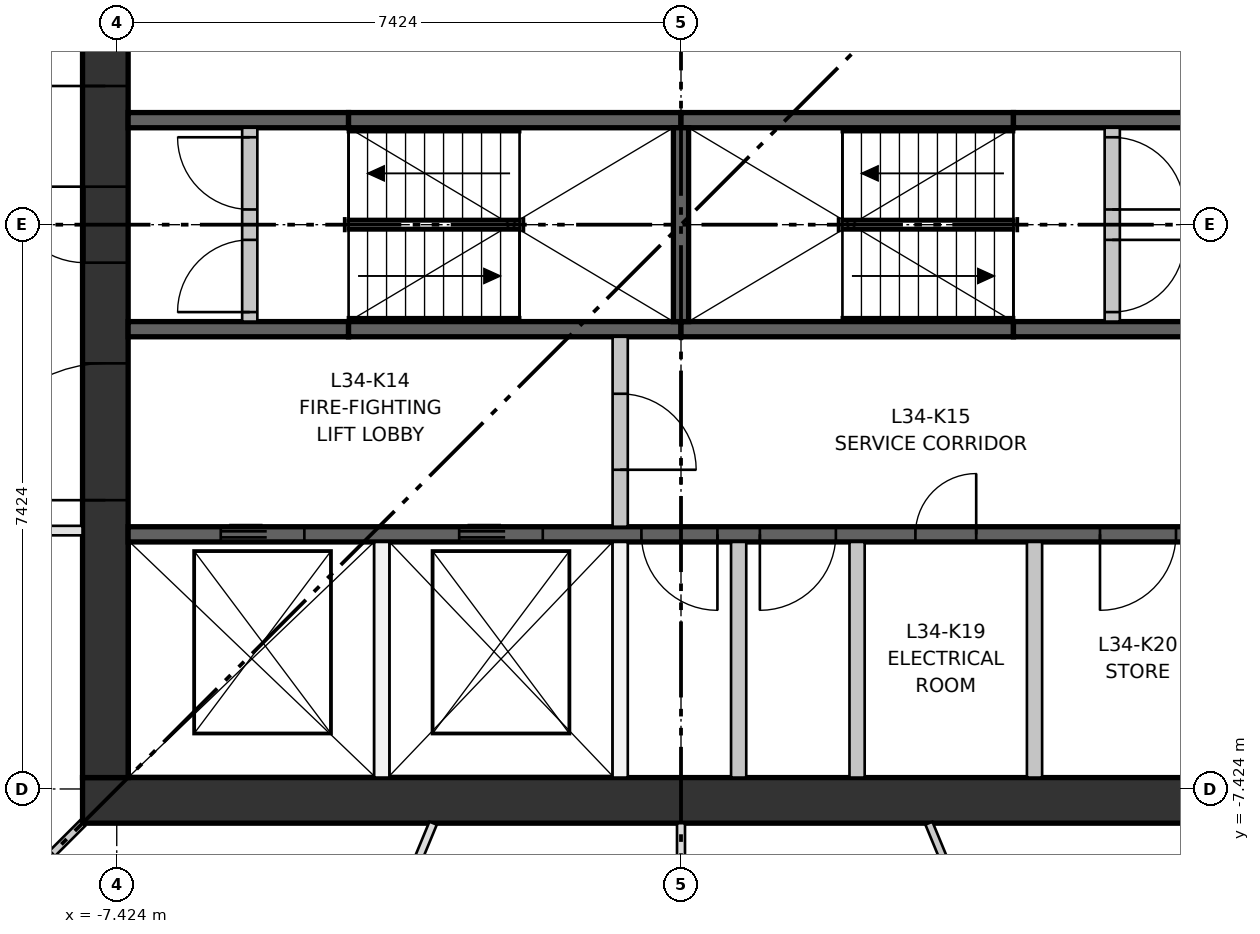
"""IFC4 building model, lengths in metres.
Left out: names, types, materials, properties, quantities, classifications, styles, units other than length and angle.
Written with IfcOpenShell. Run it as: python <this file> out.ifc"""

import sys

from ifc_helpers import new_model, si_unit, direction, frame, frame_2d, origin, place, context, subcontext, project, spatial, rectangle, extrude, element, fill, save


model = new_model("IFC4")
c1 = context("Model", 3, precision=1e-05, world=origin(), true_north=direction((0.0, 1.0)))
c2 = subcontext(c1, "Body", "Model", "MODEL_VIEW")
j1 = project(units=[si_unit("LENGTHUNIT", "METRE"), si_unit("PLANEANGLEUNIT", "RADIAN")], contexts=[c1])
p1 = place(None, origin())
s1 = spatial("IfcSite", under=j1, at=p1, CompositionType="ELEMENT")
p2 = place(p1, origin())
s2 = spatial("IfcBuilding", under=s1, at=p2, CompositionType="ELEMENT")
p3 = place(p2, frame((0.0, 0.0, 131.0)))
s3 = spatial("IfcBuildingStorey", under=s2, at=p3, CompositionType="ELEMENT", Elevation=131.0)
p4 = place(p3, frame((-7.874, -7.574, 0.0), z_axis=(0.0, 0.0, 1.0), x_axis=(1.0, 0.0, 0.0)))
e1 = element("IfcWall", 1, at=p4, inside=s3, PredefinedType="SHEAR", context=c2, shape_type="SweptSolid", body=[
    extrude(rectangle(XDim=15.748, YDim=0.6, at=frame_2d((7.874, 0.0))), origin(), (0.0, 0.0, 1.0), 3.35),
])
p5 = place(p3, frame((-7.574, -7.274, 0.0), z_axis=(0.0, 0.0, 1.0), x_axis=(0.0, 1.0, 0.0)))
e2 = element("IfcWall", 2, at=p5, inside=s3, PredefinedType="SHEAR", context=c2, shape_type="SweptSolid", body=[
    extrude(rectangle(XDim=14.548, YDim=0.6, at=frame_2d((7.274, 0.0))), origin(), (0.0, 0.0, 1.0), 3.35),
])
p6 = place(p5, frame((6.774, 0.0, 0.0)))
e3 = element("IfcOpeningElement", 3, at=p6, cuts=e2, PredefinedType="OPENING", context=c2, shape_type="SweptSolid", body=[
    extrude(rectangle(XDim=1.0, YDim=2.1, at=frame_2d((0.5, 1.05))), frame((0.0, 0.31, 0.0), z_axis=(0.0, -1.0, 0.0), x_axis=(1.0, 0.0, 0.0)), (0.0, 0.0, 1.0), 0.62),
])
p7 = place(p5, frame((3.649, 0.0, 0.0)))
e4 = element("IfcOpeningElement", 4, at=p7, cuts=e2, PredefinedType="OPENING", context=c2, shape_type="SweptSolid", body=[
    extrude(rectangle(XDim=1.8, YDim=2.1, at=frame_2d((0.9, 1.05))), frame((0.0, 0.31, 0.0), z_axis=(0.0, -1.0, 0.0), x_axis=(1.0, 0.0, 0.0)), (0.0, 0.0, 1.0), 0.62),
])
p8 = place(p5, frame((9.098, 0.0, 0.0)))
e5 = element("IfcOpeningElement", 5, at=p8, cuts=e2, PredefinedType="OPENING", context=c2, shape_type="SweptSolid", body=[
    extrude(rectangle(XDim=1.8, YDim=2.1, at=frame_2d((0.9, 1.05))), frame((0.0, 0.31, 0.0), z_axis=(0.0, -1.0, 0.0), x_axis=(1.0, 0.0, 0.0)), (0.0, 0.0, 1.0), 0.62),
])
p9 = place(p3, frame((-7.274, -4.074, 0.0), z_axis=(0.0, 0.0, 1.0), x_axis=(1.0, 0.0, 0.0)))
e6 = element("IfcWall", 6, at=p9, inside=s3, PredefinedType="SHEAR", context=c2, shape_type="SweptSolid", body=[
    extrude(rectangle(XDim=14.548, YDim=0.2, at=frame_2d((7.274, 0.0))), origin(), (0.0, 0.0, 1.0), 3.0),
])
p10 = place(p9, frame((1.219, 0.0, 0.0)))
e7 = element("IfcOpeningElement", 7, at=p10, cuts=e6, PredefinedType="OPENING", context=c2, shape_type="SweptSolid", body=[
    extrude(rectangle(XDim=1.1, YDim=2.1, at=frame_2d((0.55, 1.05))), frame((0.0, 0.11, 0.0), z_axis=(0.0, -1.0, 0.0), x_axis=(1.0, 0.0, 0.0)), (0.0, 0.0, 1.0), 0.22),
])
p11 = place(p9, frame((4.355, 0.0, 0.0)))
e8 = element("IfcOpeningElement", 8, at=p11, cuts=e6, PredefinedType="OPENING", context=c2, shape_type="SweptSolid", body=[
    extrude(rectangle(XDim=1.1, YDim=2.1, at=frame_2d((0.55, 1.05))), frame((0.0, 0.11, 0.0), z_axis=(0.0, -1.0, 0.0), x_axis=(1.0, 0.0, 0.0)), (0.0, 0.0, 1.0), 0.22),
])
p12 = place(p9, frame((6.753, 0.0, 0.0)))
e9 = element("IfcOpeningElement", 9, at=p12, cuts=e6, PredefinedType="OPENING", context=c2, shape_type="SweptSolid", body=[
    extrude(rectangle(XDim=1.0, YDim=2.1, at=frame_2d((0.5, 1.05))), frame((0.0, 0.11, 0.0), z_axis=(0.0, -1.0, 0.0), x_axis=(1.0, 0.0, 0.0)), (0.0, 0.0, 1.0), 0.22),
])
p13 = place(p9, frame((8.312, 0.0, 0.0)))
e10 = element("IfcOpeningElement", 10, at=p13, cuts=e6, PredefinedType="OPENING", context=c2, shape_type="SweptSolid", body=[
    extrude(rectangle(XDim=1.0, YDim=2.1, at=frame_2d((0.5, 1.05))), frame((0.0, 0.11, 0.0), z_axis=(0.0, -1.0, 0.0), x_axis=(1.0, 0.0, 0.0)), (0.0, 0.0, 1.0), 0.22),
])
p14 = place(p9, frame((10.358, 0.0, 0.0)))
e11 = element("IfcOpeningElement", 11, at=p14, cuts=e6, PredefinedType="OPENING", context=c2, shape_type="SweptSolid", body=[
    extrude(rectangle(XDim=0.8, YDim=2.1, at=frame_2d((0.4, 1.05))), frame((0.0, 0.11, 0.0), z_axis=(0.0, -1.0, 0.0), x_axis=(1.0, 0.0, 0.0)), (0.0, 0.0, 1.0), 0.22),
])
p15 = place(p9, frame((12.787, 0.0, 0.0)))
e12 = element("IfcOpeningElement", 12, at=p15, cuts=e6, PredefinedType="OPENING", context=c2, shape_type="SweptSolid", body=[
    extrude(rectangle(XDim=1.0, YDim=2.1, at=frame_2d((0.5, 1.05))), frame((0.0, 0.11, 0.0), z_axis=(0.0, -1.0, 0.0), x_axis=(1.0, 0.0, 0.0)), (0.0, 0.0, 1.0), 0.22),
])
p16 = place(p3, frame((-7.274, -1.375, 0.0), z_axis=(0.0, 0.0, 1.0), x_axis=(1.0, 0.0, 0.0)))
e13 = element("IfcWall", 13, at=p16, inside=s3, PredefinedType="SHEAR", context=c2, shape_type="SweptSolid", body=[
    extrude(rectangle(XDim=2.9, YDim=0.2, at=frame_2d((1.45, 0.0))), origin(), (0.0, 0.0, 1.0), 3.0),
])
for number, where, z_axis, x_axis in (
    (14, (-4.374, -1.375, 0.0), (0.0, 0.0, 1.0), (1.0, 0.0, 0.0)),
    (15, (0.0, -1.375, 0.0), (0.0, 0.0, 1.0), (1.0, 0.0, 0.0)),
):
    element("IfcWall", number, at=place(p3, frame(where, z_axis=z_axis, x_axis=x_axis)), inside=s3, PredefinedType="SHEAR", context=c2, shape_type="SweptSolid", body=[
        extrude(rectangle(XDim=4.374, YDim=0.2, at=frame_2d((2.187, 0.0))), origin(), (0.0, 0.0, 1.0), 3.0),
    ])
for number, where, z_axis, x_axis in (
    (16, (4.374, -1.375, 0.0), (0.0, 0.0, 1.0), (1.0, 0.0, 0.0)),
    (17, (-7.274, 1.375, 0.0), (0.0, 0.0, 1.0), (1.0, 0.0, 0.0)),
):
    element("IfcWall", number, at=place(p3, frame(where, z_axis=z_axis, x_axis=x_axis)), inside=s3, PredefinedType="SHEAR", context=c2, shape_type="SweptSolid", body=[
        extrude(rectangle(XDim=2.9, YDim=0.2, at=frame_2d((1.45, 0.0))), origin(), (0.0, 0.0, 1.0), 3.0),
    ])
for number, where, z_axis, x_axis in (
    (18, (-4.374, 1.375, 0.0), (0.0, 0.0, 1.0), (1.0, 0.0, 0.0)),
    (19, (0.0, 1.375, 0.0), (0.0, 0.0, 1.0), (1.0, 0.0, 0.0)),
):
    element("IfcWall", number, at=place(p3, frame(where, z_axis=z_axis, x_axis=x_axis)), inside=s3, PredefinedType="SHEAR", context=c2, shape_type="SweptSolid", body=[
        extrude(rectangle(XDim=4.374, YDim=0.2, at=frame_2d((2.187, 0.0))), origin(), (0.0, 0.0, 1.0), 3.0),
    ])
p17 = place(p3, frame((4.374, 1.375, 0.0), z_axis=(0.0, 0.0, 1.0), x_axis=(1.0, 0.0, 0.0)))
e20 = element("IfcWall", 20, at=p17, inside=s3, PredefinedType="SHEAR", context=c2, shape_type="SweptSolid", body=[
    extrude(rectangle(XDim=2.9, YDim=0.2, at=frame_2d((1.45, 0.0))), origin(), (0.0, 0.0, 1.0), 3.0),
])
p18 = place(p3, frame((0.0, -1.275, 0.0), z_axis=(0.0, 0.0, 1.0), x_axis=(0.0, 1.0, 0.0)))
e21 = element("IfcWall", 21, at=p18, inside=s3, PredefinedType="SHEAR", context=c2, shape_type="SweptSolid", body=[
    extrude(rectangle(XDim=2.55, YDim=0.2, at=frame_2d((1.275, 0.0))), origin(), (0.0, 0.0, 1.0), 3.0),
])
for number, where, z_axis, x_axis in (
    (22, (-3.937, -7.274, 0.0), (0.0, 0.0, 1.0), (0.0, 1.0, 0.0)),
    (23, (-0.8, -7.274, 0.0), (0.0, 0.0, 1.0), (0.0, 1.0, 0.0)),
):
    element("IfcWall", number, at=place(p3, frame(where, z_axis=z_axis, x_axis=x_axis)), inside=s3, PredefinedType="PARTITIONING", context=c2, shape_type="SweptSolid", body=[
        extrude(rectangle(XDim=3.1, YDim=0.2, at=frame_2d((1.55, 0.0))), origin(), (0.0, 0.0, 1.0), 3.0),
    ])
p19 = place(p3, frame((-0.8, -3.974, 0.0), z_axis=(0.0, 0.0, 1.0), x_axis=(0.0, 1.0, 0.0)))
e24 = element("IfcWall", 24, at=p19, inside=s3, PredefinedType="PARTITIONING", context=c2, shape_type="SweptSolid", body=[
    extrude(rectangle(XDim=2.499, YDim=0.2, at=frame_2d((1.25, 0.0))), origin(), (0.0, 0.0, 1.0), 3.0),
])
p20 = place(p19, frame((0.75, 0.0, 0.0)))
e25 = element("IfcOpeningElement", 25, at=p20, cuts=e24, PredefinedType="OPENING", context=c2, shape_type="SweptSolid", body=[
    extrude(rectangle(XDim=1.0, YDim=2.1, at=frame_2d((0.5, 1.05))), frame((0.0, 0.11, 0.0), z_axis=(0.0, -1.0, 0.0), x_axis=(1.0, 0.0, 0.0)), (0.0, 0.0, 1.0), 0.22),
])
for number, where, z_axis, x_axis in (
    (26, (0.758, -7.274, 0.0), (0.0, 0.0, 1.0), (0.0, 1.0, 0.0)),
    (27, (2.317, -7.274, 0.0), (0.0, 0.0, 1.0), (0.0, 1.0, 0.0)),
    (28, (4.651, -7.274, 0.0), (0.0, 0.0, 1.0), (0.0, 1.0, 0.0)),
):
    element("IfcWall", number, at=place(p3, frame(where, z_axis=z_axis, x_axis=x_axis)), inside=s3, PredefinedType="PARTITIONING", context=c2, shape_type="SweptSolid", body=[
        extrude(rectangle(XDim=3.1, YDim=0.2, at=frame_2d((1.55, 0.0))), origin(), (0.0, 0.0, 1.0), 3.0),
    ])
p21 = place(p3, frame((-5.674, -1.275, 0.0), z_axis=(0.0, 0.0, 1.0), x_axis=(0.0, 1.0, 0.0)))
e29 = element("IfcWall", 29, at=p21, inside=s3, PredefinedType="PARTITIONING", context=c2, shape_type="SweptSolid", body=[
    extrude(rectangle(XDim=2.55, YDim=0.2, at=frame_2d((1.275, 0.0))), origin(), (0.0, 0.0, 1.0), 3.0),
])
p22 = place(p21, frame((0.125, 0.0, 0.0)))
e30 = element("IfcOpeningElement", 30, at=p22, cuts=e29, PredefinedType="OPENING", context=c2, shape_type="SweptSolid", body=[
    extrude(rectangle(XDim=0.95, YDim=2.1, at=frame_2d((0.475, 1.05))), frame((0.0, 0.11, 0.0), z_axis=(0.0, -1.0, 0.0), x_axis=(1.0, 0.0, 0.0)), (0.0, 0.0, 1.0), 0.22),
])
p23 = place(p21, frame((1.475, 0.0, 0.0)))
e31 = element("IfcOpeningElement", 31, at=p23, cuts=e29, PredefinedType="OPENING", context=c2, shape_type="SweptSolid", body=[
    extrude(rectangle(XDim=0.95, YDim=2.1, at=frame_2d((0.475, 1.05))), frame((0.0, 0.11, 0.0), z_axis=(0.0, -1.0, 0.0), x_axis=(1.0, 0.0, 0.0)), (0.0, 0.0, 1.0), 0.22),
])
p24 = place(p3, frame((5.674, -1.275, 0.0), z_axis=(0.0, 0.0, 1.0), x_axis=(0.0, 1.0, 0.0)))
e32 = element("IfcWall", 32, at=p24, inside=s3, PredefinedType="PARTITIONING", context=c2, shape_type="SweptSolid", body=[
    extrude(rectangle(XDim=2.55, YDim=0.2, at=frame_2d((1.275, 0.0))), origin(), (0.0, 0.0, 1.0), 3.0),
])
p25 = place(p24, frame((0.125, 0.0, 0.0)))
e33 = element("IfcOpeningElement", 33, at=p25, cuts=e32, PredefinedType="OPENING", context=c2, shape_type="SweptSolid", body=[
    extrude(rectangle(XDim=0.95, YDim=2.1, at=frame_2d((0.475, 1.05))), frame((0.0, 0.11, 0.0), z_axis=(0.0, -1.0, 0.0), x_axis=(1.0, 0.0, 0.0)), (0.0, 0.0, 1.0), 0.22),
])
p26 = place(p24, frame((1.475, 0.0, 0.0)))
e34 = element("IfcOpeningElement", 34, at=p26, cuts=e32, PredefinedType="OPENING", context=c2, shape_type="SweptSolid", body=[
    extrude(rectangle(XDim=0.95, YDim=2.1, at=frame_2d((0.475, 1.05))), frame((0.0, 0.11, 0.0), z_axis=(0.0, -1.0, 0.0), x_axis=(1.0, 0.0, 0.0)), (0.0, 0.0, 1.0), 0.22),
])
p27 = place(p3, frame((-7.874, -4.024, 0.0), z_axis=(0.0, 0.0, 1.0), x_axis=(-1.0, 0.0, 0.0)))
e35 = element("IfcWall", 35, at=p27, inside=s3, PredefinedType="PARTITIONING", context=c2, shape_type="SweptSolid", body=[
    extrude(rectangle(XDim=6.458, YDim=0.125, at=frame_2d((3.229, 0.0))), origin(), (0.0, 0.0, 1.0), 3.0),
])
p28 = place(p27, frame((2.7, 0.0, 0.0)))
e36 = element("IfcOpeningElement", 36, at=p28, cuts=e35, PredefinedType="OPENING", context=c2, shape_type="SweptSolid", body=[
    extrude(rectangle(XDim=1.0, YDim=2.1, at=frame_2d((0.5, 1.05))), frame((0.0, 0.073, 0.0), z_axis=(0.0, -1.0, 0.0), x_axis=(1.0, 0.0, 0.0)), (0.0, 0.0, 1.0), 0.145),
])
p29 = place(p3, frame((-7.874, -7.874, 0.0), z_axis=(0.0, 0.0, 1.0), x_axis=(-0.707106781187, -0.707106781187, 0.0)))
e37 = element("IfcWall", 37, at=p29, inside=s3, PredefinedType="PARTITIONING", context=c2, shape_type="SweptSolid", body=[
    extrude(rectangle(XDim=6.714, YDim=0.1, at=frame_2d((3.357, 0.0))), origin(), (0.0, 0.0, 1.0), 3.0),
])
p30 = place(p29, frame((2.7, 0.0, 0.0)))
e38 = element("IfcOpeningElement", 38, at=p30, cuts=e37, PredefinedType="OPENING", context=c2, shape_type="SweptSolid", body=[
    extrude(rectangle(XDim=1.0, YDim=2.1, at=frame_2d((0.5, 1.05))), frame((0.0, 0.06, 0.0), z_axis=(0.0, -1.0, 0.0), x_axis=(1.0, 0.0, 0.0)), (0.0, 0.0, 1.0), 0.12),
])
p31 = place(p3, frame((-3.261, -7.874, 0.0), z_axis=(0.0, 0.0, 1.0), x_axis=(-0.382681880818, -0.923880175181, 0.0)))
e39 = element("IfcWall", 39, at=p31, inside=s3, PredefinedType="PARTITIONING", context=c2, shape_type="SweptSolid", body=[
    extrude(rectangle(XDim=5.857, YDim=0.105, at=frame_2d((2.929, 0.0))), origin(), (0.0, 0.0, 1.0), 3.0),
])
p32 = place(p31, frame((2.4, 0.0, 0.0)))
e40 = element("IfcOpeningElement", 40, at=p32, cuts=e39, PredefinedType="OPENING", context=c2, shape_type="SweptSolid", body=[
    extrude(rectangle(XDim=1.0, YDim=2.1, at=frame_2d((0.5, 1.05))), frame((0.0, 0.062, 0.0), z_axis=(0.0, -1.0, 0.0), x_axis=(1.0, 0.0, 0.0)), (0.0, 0.0, 1.0), 0.125),
])
p33 = place(p3, frame((0.0, -7.874, 0.0), z_axis=(0.0, 0.0, 1.0), x_axis=(0.0, -1.0, 0.0)))
e41 = element("IfcWall", 41, at=p33, inside=s3, PredefinedType="PARTITIONING", context=c2, shape_type="SweptSolid", body=[
    extrude(rectangle(XDim=6.506, YDim=0.105, at=frame_2d((3.253, 0.0))), origin(), (0.0, 0.0, 1.0), 3.0),
])
p34 = place(p3, frame((5.503, -13.285, 0.0), z_axis=(0.0, 0.0, 1.0), x_axis=(-0.382681880818, 0.923880175181, 0.0)))
e42 = element("IfcWall", 42, at=p34, inside=s3, PredefinedType="PARTITIONING", context=c2, shape_type="SweptSolid", body=[
    extrude(rectangle(XDim=5.857, YDim=0.1, at=frame_2d((2.929, 0.0))), origin(), (0.0, 0.0, 1.0), 3.0),
])
p35 = place(p34, frame((2.4, 0.0, 0.0)))
e43 = element("IfcOpeningElement", 43, at=p35, cuts=e42, PredefinedType="OPENING", context=c2, shape_type="SweptSolid", body=[
    extrude(rectangle(XDim=1.0, YDim=2.1, at=frame_2d((0.5, 1.05))), frame((0.0, 0.06, 0.0), z_axis=(0.0, -1.0, 0.0), x_axis=(1.0, 0.0, 0.0)), (0.0, 0.0, 1.0), 0.12),
])
p36 = place(p10, origin())
e44 = element("IfcDoor", 44, at=p36, inside=s3, OperationType="DOUBLE_DOOR_SLIDING", PredefinedType="DOOR", context=c2, shape_type="SweptSolid", body=[
    extrude(rectangle(XDim=1.1, YDim=2.1, at=frame_2d((0.55, 1.05))), frame((0.0, 0.025, 0.0), z_axis=(0.0, -1.0, 0.0), x_axis=(1.0, 0.0, 0.0)), (0.0, 0.0, 1.0), 0.05),
])
fill(e7, e44)
p37 = place(p11, origin())
e45 = element("IfcDoor", 45, at=p37, inside=s3, OperationType="DOUBLE_DOOR_SLIDING", PredefinedType="DOOR", context=c2, shape_type="SweptSolid", body=[
    extrude(rectangle(XDim=1.1, YDim=2.1, at=frame_2d((0.55, 1.05))), frame((0.0, 0.025, 0.0), z_axis=(0.0, -1.0, 0.0), x_axis=(1.0, 0.0, 0.0)), (0.0, 0.0, 1.0), 0.05),
])
fill(e8, e45)
p38 = place(p22, origin())
e46 = element("IfcDoor", 46, at=p38, inside=s3, OperationType="SINGLE_SWING_LEFT", PredefinedType="DOOR", context=c2, shape_type="SweptSolid", body=[
    extrude(rectangle(XDim=0.95, YDim=2.1, at=frame_2d((0.475, 1.05))), frame((0.0, 0.025, 0.0), z_axis=(0.0, -1.0, 0.0), x_axis=(1.0, 0.0, 0.0)), (0.0, 0.0, 1.0), 0.05),
])
fill(e30, e46)
p39 = place(p23, origin())
e47 = element("IfcDoor", 47, at=p39, inside=s3, OperationType="SINGLE_SWING_RIGHT", PredefinedType="DOOR", context=c2, shape_type="SweptSolid", body=[
    extrude(rectangle(XDim=0.95, YDim=2.1, at=frame_2d((0.475, 1.05))), frame((0.0, 0.025, 0.0), z_axis=(0.0, -1.0, 0.0), x_axis=(1.0, 0.0, 0.0)), (0.0, 0.0, 1.0), 0.05),
])
fill(e31, e47)
p40 = place(p25, frame((0.95, 0.0, 0.0), z_axis=(0.0, 0.0, 1.0), x_axis=(-1.0, 0.0, 0.0)))
e48 = element("IfcDoor", 48, at=p40, inside=s3, OperationType="SINGLE_SWING_RIGHT", PredefinedType="DOOR", context=c2, shape_type="SweptSolid", body=[
    extrude(rectangle(XDim=0.95, YDim=2.1, at=frame_2d((0.475, 1.05))), frame((0.0, 0.025, 0.0), z_axis=(0.0, -1.0, 0.0), x_axis=(1.0, 0.0, 0.0)), (0.0, 0.0, 1.0), 0.05),
])
fill(e33, e48)
p41 = place(p26, frame((0.95, 0.0, 0.0), z_axis=(0.0, 0.0, 1.0), x_axis=(-1.0, 0.0, 0.0)))
e49 = element("IfcDoor", 49, at=p41, inside=s3, OperationType="SINGLE_SWING_LEFT", PredefinedType="DOOR", context=c2, shape_type="SweptSolid", body=[
    extrude(rectangle(XDim=0.95, YDim=2.1, at=frame_2d((0.475, 1.05))), frame((0.0, 0.025, 0.0), z_axis=(0.0, -1.0, 0.0), x_axis=(1.0, 0.0, 0.0)), (0.0, 0.0, 1.0), 0.05),
])
fill(e34, e49)
p42 = place(p20, frame((1.0, 0.0, 0.0), z_axis=(0.0, 0.0, 1.0), x_axis=(-1.0, 0.0, 0.0)))
e50 = element("IfcDoor", 50, at=p42, inside=s3, OperationType="SINGLE_SWING_LEFT", PredefinedType="DOOR", context=c2, shape_type="SweptSolid", body=[
    extrude(rectangle(XDim=1.0, YDim=2.1, at=frame_2d((0.5, 1.05))), frame((0.0, 0.025, 0.0), z_axis=(0.0, -1.0, 0.0), x_axis=(1.0, 0.0, 0.0)), (0.0, 0.0, 1.0), 0.05),
])
fill(e25, e50)
p43 = place(p12, frame((1.0, 0.0, 0.0), z_axis=(0.0, 0.0, 1.0), x_axis=(-1.0, 0.0, 0.0)))
e51 = element("IfcDoor", 51, at=p43, inside=s3, OperationType="SINGLE_SWING_RIGHT", PredefinedType="DOOR", context=c2, shape_type="SweptSolid", body=[
    extrude(rectangle(XDim=1.0, YDim=2.1, at=frame_2d((0.5, 1.05))), frame((0.0, 0.025, 0.0), z_axis=(0.0, -1.0, 0.0), x_axis=(1.0, 0.0, 0.0)), (0.0, 0.0, 1.0), 0.05),
])
fill(e9, e51)
p44 = place(p13, frame((1.0, 0.0, 0.0), z_axis=(0.0, 0.0, 1.0), x_axis=(-1.0, 0.0, 0.0)))
e52 = element("IfcDoor", 52, at=p44, inside=s3, OperationType="SINGLE_SWING_LEFT", PredefinedType="DOOR", context=c2, shape_type="SweptSolid", body=[
    extrude(rectangle(XDim=1.0, YDim=2.1, at=frame_2d((0.5, 1.05))), frame((0.0, 0.025, 0.0), z_axis=(0.0, -1.0, 0.0), x_axis=(1.0, 0.0, 0.0)), (0.0, 0.0, 1.0), 0.05),
])
fill(e10, e52)
p45 = place(p14, origin())
e53 = element("IfcDoor", 53, at=p45, inside=s3, OperationType="SINGLE_SWING_RIGHT", PredefinedType="DOOR", context=c2, shape_type="SweptSolid", body=[
    extrude(rectangle(XDim=0.8, YDim=2.1, at=frame_2d((0.4, 1.05))), frame((0.0, 0.025, 0.0), z_axis=(0.0, -1.0, 0.0), x_axis=(1.0, 0.0, 0.0)), (0.0, 0.0, 1.0), 0.05),
])
fill(e11, e53)
p46 = place(p15, frame((1.0, 0.0, 0.0), z_axis=(0.0, 0.0, 1.0), x_axis=(-1.0, 0.0, 0.0)))
e54 = element("IfcDoor", 54, at=p46, inside=s3, OperationType="SINGLE_SWING_LEFT", PredefinedType="DOOR", context=c2, shape_type="SweptSolid", body=[
    extrude(rectangle(XDim=1.0, YDim=2.1, at=frame_2d((0.5, 1.05))), frame((0.0, 0.025, 0.0), z_axis=(0.0, -1.0, 0.0), x_axis=(1.0, 0.0, 0.0)), (0.0, 0.0, 1.0), 0.05),
])
fill(e12, e54)
p47 = place(p6, origin())
e55 = element("IfcDoor", 55, at=p47, inside=s3, OperationType="SINGLE_SWING_RIGHT", PredefinedType="DOOR", context=c2, shape_type="SweptSolid", body=[
    extrude(rectangle(XDim=1.0, YDim=2.1, at=frame_2d((0.5, 1.05))), frame((0.0, 0.3, 0.0), z_axis=(0.0, -1.0, 0.0), x_axis=(1.0, 0.0, 0.0)), (0.0, 0.0, 1.0), 0.05),
])
fill(e3, e55)
p48 = place(p7, origin())
e56 = element("IfcDoor", 56, at=p48, inside=s3, OperationType="DOUBLE_DOOR_SINGLE_SWING", PredefinedType="DOOR", context=c2, shape_type="SweptSolid", body=[
    extrude(rectangle(XDim=1.8, YDim=2.1, at=frame_2d((0.9, 1.05))), frame((0.0, 0.025, 0.0), z_axis=(0.0, -1.0, 0.0), x_axis=(1.0, 0.0, 0.0)), (0.0, 0.0, 1.0), 0.05),
])
fill(e4, e56)
p49 = place(p8, origin())
e57 = element("IfcDoor", 57, at=p49, inside=s3, OperationType="DOUBLE_DOOR_SINGLE_SWING", PredefinedType="DOOR", context=c2, shape_type="SweptSolid", body=[
    extrude(rectangle(XDim=1.8, YDim=2.1, at=frame_2d((0.9, 1.05))), frame((0.0, 0.025, 0.0), z_axis=(0.0, -1.0, 0.0), x_axis=(1.0, 0.0, 0.0)), (0.0, 0.0, 1.0), 0.05),
])
fill(e5, e57)
save(model, sys.argv[1])
